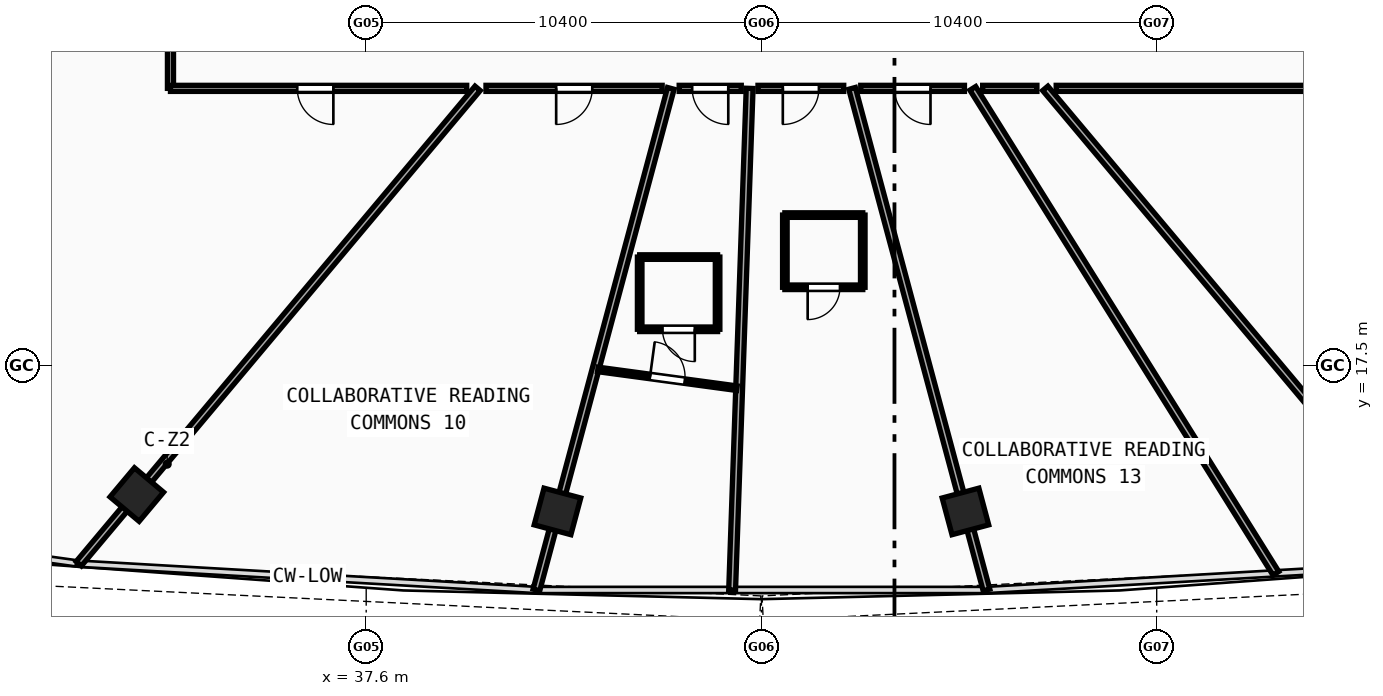
"""IFC4 building model, lengths in metres.
Left out: names, types, materials, properties, quantities, classifications, styles, units other than length and angle.
Written with IfcOpenShell. Run it as: python <this file> out.ifc"""

import sys

from ifc_helpers import new_model, si_unit, direction, frame, frame_2d, origin, origin_with_axes, origin_2d, place, context, subcontext, project, spatial, rectangle, hollow_rectangle, extrude, source, transform, mapped, element, fill, save


model = new_model("IFC4")
c1 = context("Model", 3, precision=1e-05, world=origin(), true_north=direction((0.0, 1.0)))
c2 = subcontext(c1, "Body", "Model", "MODEL_VIEW")
j1 = project(units=[si_unit("LENGTHUNIT", "METRE"), si_unit("PLANEANGLEUNIT", "RADIAN")], contexts=[c1])
p1 = place(None, origin())
s1 = spatial("IfcSite", under=j1, at=p1, CompositionType="ELEMENT")
p2 = place(p1, origin())
s2 = spatial("IfcBuilding", under=s1, at=p2, CompositionType="ELEMENT")
p3 = place(p2, frame((0.0, 0.0, 81.18)))
s3 = spatial("IfcBuildingStorey", under=s2, at=p3, CompositionType="ELEMENT", Elevation=81.18)
m1 = source(origin(), c2, "Body", "SweptSolid", [
    extrude(hollow_rectangle(XDim=1.0, YDim=1.0, WallThickness=0.042, at=origin_2d()), origin(), (0.0, 0.0, 1.0), 3.8),
])
for number, where, z_axis, x_axis in (
    (1, (31.564, 14.112, -0.26), (0.0, 0.0, 1.0), (0.766, -0.643, 0.0)),
    (2, (42.633, 13.668, -0.26), (0.0, 0.0, 1.0), (0.966, -0.259, 0.0)),
    (3, (53.367, 13.668, -0.26), (0.0, 0.0, 1.0), (0.966, 0.259, 0.0)),
):
    element("IfcColumn", number, at=place(p3, frame(where, z_axis=z_axis, x_axis=x_axis)), inside=s3, PredefinedType="COLUMN", context=c2, shape_type="MappedRepresentation", body=[
        mapped(m1, transform((0.0, 0.0, 0.0), scale=1.0)),
    ])
p4 = place(p3, frame((40.532, 24.8, 0.0), z_axis=(0.0, 0.0, 1.0), x_axis=(-0.642790086939, -0.76604236445, 0.0)))
e4 = element("IfcWall", 4, at=p4, inside=s3, PredefinedType="PARTITIONING", context=c2, shape_type="SweptSolid", body=[
    extrude(rectangle(XDim=16.326, YDim=0.18, at=frame_2d((8.163, 0.0))), origin(), (0.0, 0.0, 1.0), 2.84),
])
p5 = place(p3, frame((45.615, 24.8, 0.0), z_axis=(0.0, 0.0, 1.0), x_axis=(-0.25881675816, -0.965926439071, 0.0)))
e5 = element("IfcWall", 5, at=p5, inside=s3, PredefinedType="PARTITIONING", context=c2, shape_type="SweptSolid", body=[
    extrude(rectangle(XDim=13.665, YDim=0.18, at=frame_2d((6.832, 0.0))), origin(), (0.0, 0.0, 1.0), 2.84),
])
p6 = place(p3, frame((47.689, 24.8, 0.0), z_axis=(0.0, 0.0, 1.0), x_axis=(-0.034900944933, -0.999390776445, 0.0)))
e6 = element("IfcWall", 6, at=p6, inside=s3, PredefinedType="PARTITIONING", context=c2, shape_type="SweptSolid", body=[
    extrude(rectangle(XDim=13.207, YDim=0.18, at=frame_2d((6.604, 0.0))), origin(), (0.0, 0.0, 1.0), 2.84),
])
p7 = place(p3, frame((50.385, 24.8, 0.0), z_axis=(0.0, 0.0, 1.0), x_axis=(0.25881675816, -0.965926439071, 0.0)))
e7 = element("IfcWall", 7, at=p7, inside=s3, PredefinedType="PARTITIONING", context=c2, shape_type="SweptSolid", body=[
    extrude(rectangle(XDim=13.665, YDim=0.18, at=frame_2d((6.832, 0.0))), origin(), (0.0, 0.0, 1.0), 2.84),
])
p8 = place(p3, frame((53.561, 24.8, 0.0), z_axis=(0.0, 0.0, 1.0), x_axis=(0.529927477017, -0.848042964184, 0.0)))
e8 = element("IfcWall", 8, at=p8, inside=s3, PredefinedType="PARTITIONING", context=c2, shape_type="SweptSolid", body=[
    extrude(rectangle(XDim=15.048, YDim=0.18, at=frame_2d((7.524, 0.0))), origin(), (0.0, 0.0, 1.0), 2.84),
])
p9 = place(p3, frame((55.468, 24.8, 0.0), z_axis=(0.0, 0.0, 1.0), x_axis=(0.642790086939, -0.76604236445, 0.0)))
e9 = element("IfcWall", 9, at=p9, inside=s3, PredefinedType="PARTITIONING", context=c2, shape_type="SweptSolid", body=[
    extrude(rectangle(XDim=16.326, YDim=0.18, at=frame_2d((8.163, 0.0))), origin(), (0.0, 0.0, 1.0), 2.84),
])
p10 = place(p3, frame((32.45, 24.8, 0.0), z_axis=(0.0, 0.0, 1.0), x_axis=(0.0, 1.0, 0.0)))
e10 = element("IfcWall", 10, at=p10, inside=s3, PredefinedType="PARTITIONING", context=c2, shape_type="SweptSolid", body=[
    extrude(rectangle(XDim=5.935, YDim=0.16, at=frame_2d((2.967, 0.0))), origin(), (0.0, 0.0, 1.0), 3.14),
])
p11 = place(p3, frame((64.2, 24.8, 0.0), z_axis=(0.0, 0.0, 1.0), x_axis=(-1.0, 0.0, 0.0)))
e11 = element("IfcWall", 11, at=p11, inside=s3, PredefinedType="PARTITIONING", context=c2, shape_type="SweptSolid", body=[
    extrude(rectangle(XDim=8.445, YDim=0.16, at=frame_2d((4.222, 0.0))), origin(), (0.0, 0.0, 1.0), 3.14),
])
p12 = place(p3, frame((55.248, 24.8, 0.0), z_axis=(0.0, 0.0, 1.0), x_axis=(-1.0, 0.0, 0.0)))
e12 = element("IfcWall", 12, at=p12, inside=s3, PredefinedType="PARTITIONING", context=c2, shape_type="SweptSolid", body=[
    extrude(rectangle(XDim=1.427, YDim=0.16, at=frame_2d((0.714, 0.0))), origin(), (0.0, 0.0, 1.0), 2.84),
])
p13 = place(p3, frame((53.342, 24.8, 0.0), z_axis=(0.0, 0.0, 1.0), x_axis=(-1.0, 0.0, 0.0)))
e13 = element("IfcWall", 13, at=p13, inside=s3, PredefinedType="PARTITIONING", context=c2, shape_type="SweptSolid", body=[
    extrude(rectangle(XDim=2.729, YDim=0.16, at=frame_2d((1.365, 0.0))), origin(), (0.0, 0.0, 1.0), 3.54),
])
p14 = place(p13, frame((0.894, 0.0, 0.0)))
e14 = element("IfcOpeningElement", 14, at=p14, cuts=e13, PredefinedType="OPENING", context=c2, shape_type="SweptSolid", body=[
    extrude(rectangle(XDim=0.95, YDim=2.1, at=frame_2d((0.475, 1.05))), frame((0.0, 0.09, 0.0), z_axis=(0.0, -1.0, 0.0), x_axis=(1.0, 0.0, 0.0)), (0.0, 0.0, 1.0), 0.18),
])
p15 = place(p3, frame((50.165, 24.8, 0.0), z_axis=(0.0, 0.0, 1.0), x_axis=(-1.0, 0.0, 0.0)))
e15 = element("IfcWall", 15, at=p15, inside=s3, PredefinedType="PARTITIONING", context=c2, shape_type="SweptSolid", body=[
    extrude(rectangle(XDim=2.256, YDim=0.16, at=frame_2d((1.128, 0.0))), origin(), (0.0, 0.0, 1.0), 3.54),
])
p16 = place(p15, frame((0.653, 0.0, 0.0)))
e16 = element("IfcOpeningElement", 16, at=p16, cuts=e15, PredefinedType="OPENING", context=c2, shape_type="SweptSolid", body=[
    extrude(rectangle(XDim=0.95, YDim=2.1, at=frame_2d((0.475, 1.05))), frame((0.0, 0.09, 0.0), z_axis=(0.0, -1.0, 0.0), x_axis=(1.0, 0.0, 0.0)), (0.0, 0.0, 1.0), 0.18),
])
p17 = place(p3, frame((47.469, 24.8, 0.0), z_axis=(0.0, 0.0, 1.0), x_axis=(-1.0, 0.0, 0.0)))
e17 = element("IfcWall", 17, at=p17, inside=s3, PredefinedType="PARTITIONING", context=c2, shape_type="SweptSolid", body=[
    extrude(rectangle(XDim=1.634, YDim=0.16, at=frame_2d((0.817, 0.0))), origin(), (0.0, 0.0, 1.0), 3.54),
])
p18 = place(p17, frame((0.342, 0.0, 0.0)))
e18 = element("IfcOpeningElement", 18, at=p18, cuts=e17, PredefinedType="OPENING", context=c2, shape_type="SweptSolid", body=[
    extrude(rectangle(XDim=0.95, YDim=2.1, at=frame_2d((0.475, 1.05))), frame((0.0, 0.09, 0.0), z_axis=(0.0, -1.0, 0.0), x_axis=(1.0, 0.0, 0.0)), (0.0, 0.0, 1.0), 0.18),
])
p19 = place(p3, frame((45.387, 24.8, 0.0), z_axis=(0.0, 0.0, 1.0), x_axis=(-1.0, 0.0, 0.0)))
e19 = element("IfcWall", 19, at=p19, inside=s3, PredefinedType="PARTITIONING", context=c2, shape_type="SweptSolid", body=[
    extrude(rectangle(XDim=4.635, YDim=0.16, at=frame_2d((2.318, 0.0))), origin(), (0.0, 0.0, 1.0), 2.84),
])
p20 = place(p19, frame((1.839, 0.0, 0.0)))
e20 = element("IfcOpeningElement", 20, at=p20, cuts=e19, PredefinedType="OPENING", context=c2, shape_type="SweptSolid", body=[
    extrude(rectangle(XDim=0.95, YDim=2.1, at=frame_2d((0.475, 1.05))), frame((0.0, 0.09, 0.0), z_axis=(0.0, -1.0, 0.0), x_axis=(1.0, 0.0, 0.0)), (0.0, 0.0, 1.0), 0.18),
])
p21 = place(p3, frame((40.245, 24.8, 0.0), z_axis=(0.0, 0.0, 1.0), x_axis=(-1.0, 0.0, 0.0)))
e21 = element("IfcWall", 21, at=p21, inside=s3, PredefinedType="PARTITIONING", context=c2, shape_type="SweptSolid", body=[
    extrude(rectangle(XDim=7.795, YDim=0.16, at=frame_2d((3.897, 0.0))), origin(), (0.0, 0.0, 1.0), 3.14),
])
p22 = place(p21, frame((3.509, 0.0, 0.0)))
e22 = element("IfcOpeningElement", 22, at=p22, cuts=e21, PredefinedType="OPENING", context=c2, shape_type="SweptSolid", body=[
    extrude(rectangle(XDim=0.95, YDim=2.1, at=frame_2d((0.475, 1.05))), frame((0.0, 0.09, 0.0), z_axis=(0.0, -1.0, 0.0), x_axis=(1.0, 0.0, 0.0)), (0.0, 0.0, 1.0), 0.18),
])
p23 = place(p3, frame((44.796, 18.461, 0.0), z_axis=(0.0, 0.0, 1.0), x_axis=(1.0, 0.0, 0.0)))
e23 = element("IfcWall", 23, at=p23, inside=s3, PredefinedType="PARTITIONING", context=c2, shape_type="SweptSolid", body=[
    extrude(rectangle(XDim=2.05, YDim=0.12, at=frame_2d((1.025, 0.0))), origin(), (0.0, 0.0, 1.0), 3.54),
])
p24 = place(p23, frame((0.6, 0.0, 0.0)))
e24 = element("IfcOpeningElement", 24, at=p24, cuts=e23, PredefinedType="OPENING", context=c2, shape_type="SweptSolid", body=[
    extrude(rectangle(XDim=0.85, YDim=2.1, at=frame_2d((0.425, 1.05))), frame((0.0, 0.07, 0.0), z_axis=(0.0, -1.0, 0.0), x_axis=(1.0, 0.0, 0.0)), (0.0, 0.0, 1.0), 0.14),
])
p25 = place(p3, frame((46.846, 18.461, 0.0), z_axis=(0.0, 0.0, 1.0), x_axis=(0.0, 1.0, 0.0)))
e25 = element("IfcWall", 25, at=p25, inside=s3, PredefinedType="PARTITIONING", context=c2, shape_type="SweptSolid", body=[
    extrude(rectangle(XDim=1.9, YDim=0.12, at=frame_2d((0.95, 0.0))), origin(), (0.0, 0.0, 1.0), 3.54),
])
p26 = place(p3, frame((46.846, 20.361, 0.0), z_axis=(0.0, 0.0, 1.0), x_axis=(-1.0, 0.0, 0.0)))
e26 = element("IfcWall", 26, at=p26, inside=s3, PredefinedType="PARTITIONING", context=c2, shape_type="SweptSolid", body=[
    extrude(rectangle(XDim=2.05, YDim=0.12, at=frame_2d((1.025, 0.0))), origin(), (0.0, 0.0, 1.0), 3.54),
])
p27 = place(p3, frame((44.796, 20.361, 0.0), z_axis=(0.0, 0.0, 1.0), x_axis=(0.0, -1.0, 0.0)))
e27 = element("IfcWall", 27, at=p27, inside=s3, PredefinedType="PARTITIONING", context=c2, shape_type="SweptSolid", body=[
    extrude(rectangle(XDim=1.9, YDim=0.12, at=frame_2d((0.95, 0.0))), origin(), (0.0, 0.0, 1.0), 3.54),
])
p28 = place(p3, frame((43.696, 17.405, 0.0), z_axis=(0.0, 0.0, 1.0), x_axis=(0.99099005791, -0.133935451329, 0.0)))
e28 = element("IfcWall", 28, at=p28, inside=s3, PredefinedType="PARTITIONING", context=c2, shape_type="SweptSolid", body=[
    extrude(rectangle(XDim=3.691, YDim=0.12, at=frame_2d((1.846, 0.0))), origin(), (0.0, 0.0, 1.0), 2.84),
])
p29 = place(p28, frame((1.385, 0.0, 0.0)))
e29 = element("IfcOpeningElement", 29, at=p29, cuts=e28, PredefinedType="OPENING", context=c2, shape_type="SweptSolid", body=[
    extrude(rectangle(XDim=0.92, YDim=2.1, at=frame_2d((0.46, 1.05))), frame((0.0, 0.07, 0.0), z_axis=(0.0, -1.0, 0.0), x_axis=(1.0, 0.0, 0.0)), (0.0, 0.0, 1.0), 0.14),
])
p30 = place(p3, frame((48.616, 19.566, 0.0), z_axis=(0.0, 0.0, 1.0), x_axis=(1.0, 0.0, 0.0)))
e30 = element("IfcWall", 30, at=p30, inside=s3, PredefinedType="PARTITIONING", context=c2, shape_type="SweptSolid", body=[
    extrude(rectangle(XDim=2.05, YDim=0.12, at=frame_2d((1.025, 0.0))), origin(), (0.0, 0.0, 1.0), 3.54),
])
p31 = place(p30, frame((0.6, 0.0, 0.0)))
e31 = element("IfcOpeningElement", 31, at=p31, cuts=e30, PredefinedType="OPENING", context=c2, shape_type="SweptSolid", body=[
    extrude(rectangle(XDim=0.85, YDim=2.1, at=frame_2d((0.425, 1.05))), frame((0.0, 0.07, 0.0), z_axis=(0.0, -1.0, 0.0), x_axis=(1.0, 0.0, 0.0)), (0.0, 0.0, 1.0), 0.14),
])
p32 = place(p3, frame((50.666, 19.566, 0.0), z_axis=(0.0, 0.0, 1.0), x_axis=(0.0, 1.0, 0.0)))
e32 = element("IfcWall", 32, at=p32, inside=s3, PredefinedType="PARTITIONING", context=c2, shape_type="SweptSolid", body=[
    extrude(rectangle(XDim=1.9, YDim=0.12, at=frame_2d((0.95, 0.0))), origin(), (0.0, 0.0, 1.0), 3.54),
])
p33 = place(p3, frame((50.666, 21.466, 0.0), z_axis=(0.0, 0.0, 1.0), x_axis=(-1.0, 0.0, 0.0)))
e33 = element("IfcWall", 33, at=p33, inside=s3, PredefinedType="PARTITIONING", context=c2, shape_type="SweptSolid", body=[
    extrude(rectangle(XDim=2.05, YDim=0.12, at=frame_2d((1.025, 0.0))), origin(), (0.0, 0.0, 1.0), 3.54),
])
p34 = place(p3, frame((48.616, 21.466, 0.0), z_axis=(0.0, 0.0, 1.0), x_axis=(0.0, -1.0, 0.0)))
e34 = element("IfcWall", 34, at=p34, inside=s3, PredefinedType="PARTITIONING", context=c2, shape_type="SweptSolid", body=[
    extrude(rectangle(XDim=1.9, YDim=0.12, at=frame_2d((0.95, 0.0))), origin(), (0.0, 0.0, 1.0), 3.54),
])
m2 = source(origin(), c2, "Body", "SweptSolid", [
    extrude(rectangle(XDim=0.95, YDim=2.1, at=frame_2d((0.475, 1.05))), frame((0.0, 0.025, 0.0), z_axis=(0.0, -1.0, 0.0), x_axis=(1.0, 0.0, 0.0)), (0.0, 0.0, 1.0), 0.05),
])
p35 = place(p22, origin_with_axes())
e35 = element("IfcDoor", 35, at=p35, inside=s3, OperationType="SINGLE_SWING_LEFT", PredefinedType="DOOR", context=c2, shape_type="MappedRepresentation", body=[
    mapped(m2, transform((0.0, 0.0, 0.0), scale=1.0)),
])
fill(e22, e35)
p36 = place(p20, origin_with_axes())
e36 = element("IfcDoor", 36, at=p36, inside=s3, OperationType="SINGLE_SWING_RIGHT", PredefinedType="DOOR", context=c2, shape_type="MappedRepresentation", body=[
    mapped(m2, transform((0.0, 0.0, 0.0), scale=1.0)),
])
fill(e20, e36)
p37 = place(p18, origin_with_axes())
e37 = element("IfcDoor", 37, at=p37, inside=s3, OperationType="SINGLE_SWING_LEFT", PredefinedType="DOOR", context=c2, shape_type="MappedRepresentation", body=[
    mapped(m2, transform((0.0, 0.0, 0.0), scale=1.0)),
])
fill(e18, e37)
m3 = source(origin(), c2, "Body", "SweptSolid", [
    extrude(rectangle(XDim=0.85, YDim=2.1, at=frame_2d((0.425, 1.05))), frame((0.0, 0.025, 0.0), z_axis=(0.0, -1.0, 0.0), x_axis=(1.0, 0.0, 0.0)), (0.0, 0.0, 1.0), 0.05),
])
p38 = place(p24, frame((0.85, 0.0, 0.0), z_axis=(0.0, 0.0, 1.0), x_axis=(-1.0, 0.0, 0.0)))
e38 = element("IfcDoor", 38, at=p38, inside=s3, OperationType="SINGLE_SWING_LEFT", PredefinedType="DOOR", context=c2, shape_type="MappedRepresentation", body=[
    mapped(m3, transform((0.0, 0.0, 0.0), scale=1.0)),
])
fill(e24, e38)
m4 = source(origin(), c2, "Body", "SweptSolid", [
    extrude(rectangle(XDim=0.92, YDim=2.1, at=frame_2d((0.46, 1.05))), frame((0.0, 0.025, 0.0), z_axis=(0.0, -1.0, 0.0), x_axis=(1.0, 0.0, 0.0)), (0.0, 0.0, 1.0), 0.05),
])
p39 = place(p29, origin_with_axes())
e39 = element("IfcDoor", 39, at=p39, inside=s3, OperationType="SINGLE_SWING_LEFT", PredefinedType="DOOR", context=c2, shape_type="MappedRepresentation", body=[
    mapped(m4, transform((0.0, 0.0, 0.0), scale=1.0)),
])
fill(e29, e39)
p40 = place(p16, origin_with_axes())
e40 = element("IfcDoor", 40, at=p40, inside=s3, OperationType="SINGLE_SWING_RIGHT", PredefinedType="DOOR", context=c2, shape_type="MappedRepresentation", body=[
    mapped(m2, transform((0.0, 0.0, 0.0), scale=1.0)),
])
fill(e16, e40)
p41 = place(p31, frame((0.85, 0.0, 0.0), z_axis=(0.0, 0.0, 1.0), x_axis=(-1.0, 0.0, 0.0)))
e41 = element("IfcDoor", 41, at=p41, inside=s3, OperationType="SINGLE_SWING_RIGHT", PredefinedType="DOOR", context=c2, shape_type="MappedRepresentation", body=[
    mapped(m3, transform((0.0, 0.0, 0.0), scale=1.0)),
])
fill(e31, e41)
p42 = place(p14, origin_with_axes())
e42 = element("IfcDoor", 42, at=p42, inside=s3, OperationType="SINGLE_SWING_LEFT", PredefinedType="DOOR", context=c2, shape_type="MappedRepresentation", body=[
    mapped(m2, transform((0.0, 0.0, 0.0), scale=1.0)),
])
fill(e14, e42)
save(model, sys.argv[1])
